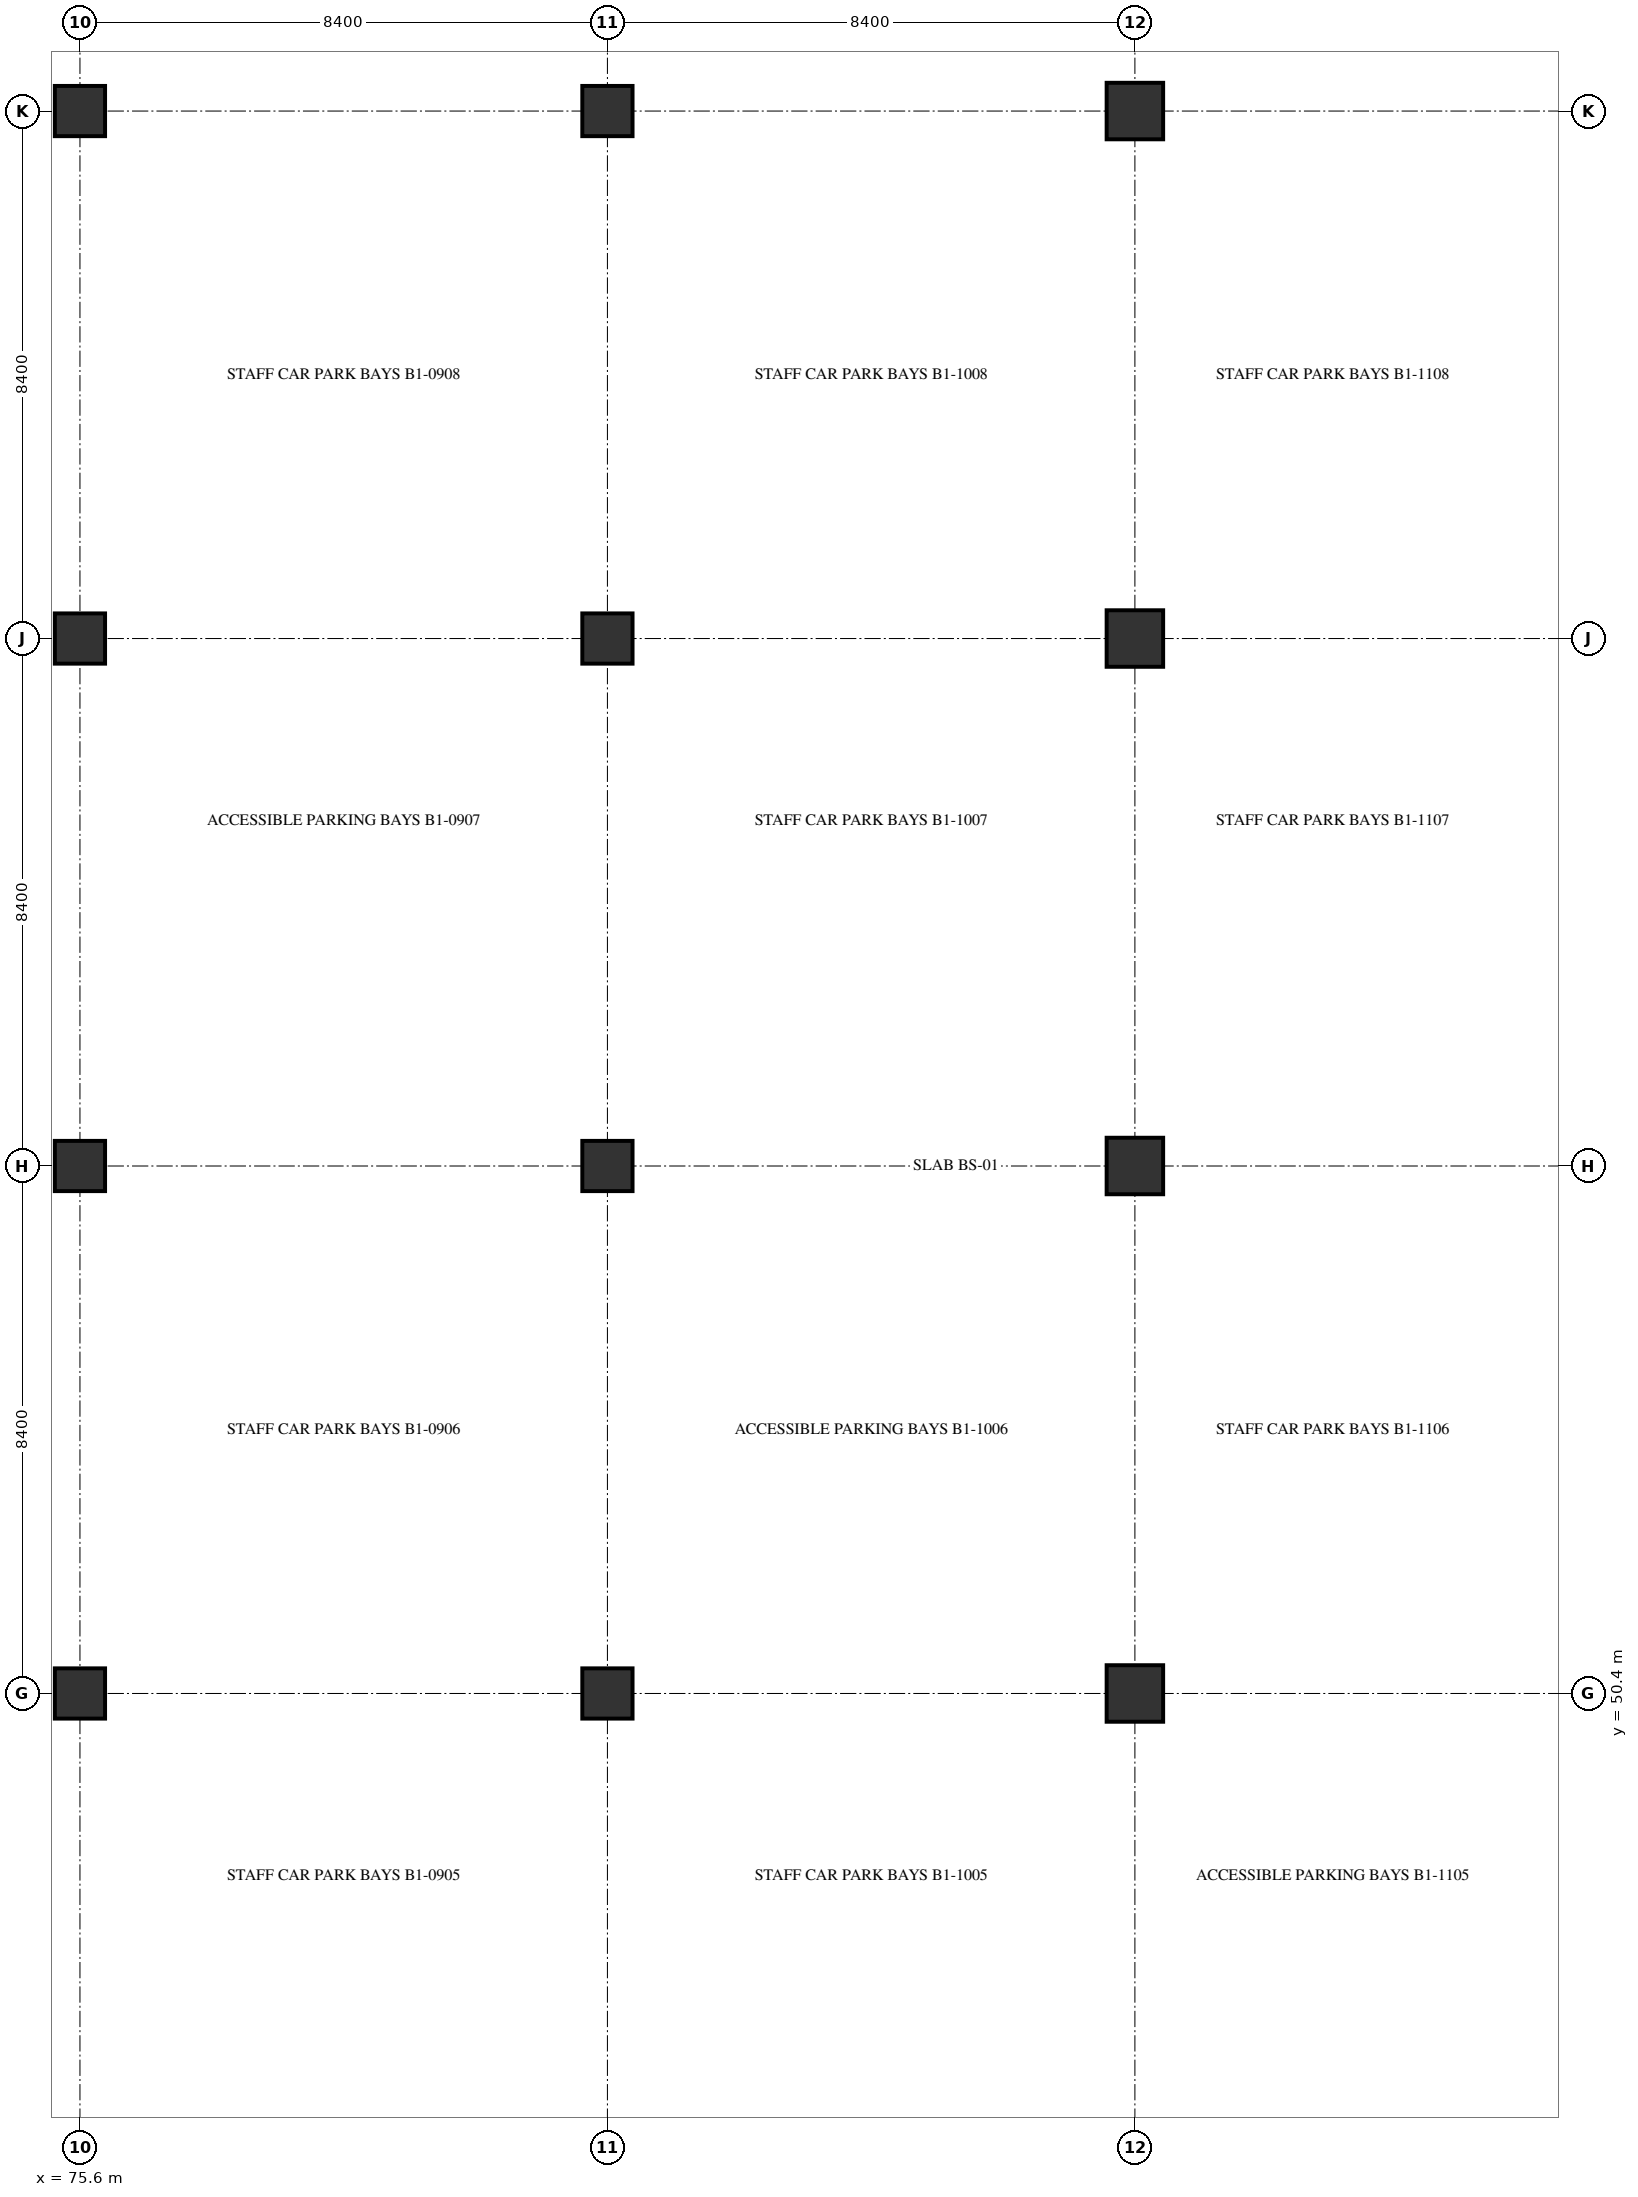
"""IFC4 building model, lengths in metres.
Left out: names, types, materials, properties, quantities, classifications, styles, units other than length and angle.
Written with IfcOpenShell. Run it as: python <this file> out.ifc"""

import sys

from ifc_helpers import new_model, si_unit, direction, frame, origin, origin_2d, place, context, subcontext, project, spatial, rectangle, extrude, element, save


model = new_model("IFC4")
c1 = context("Model", 3, precision=1e-05, world=origin(), true_north=direction((0.0, 1.0)))
c2 = subcontext(c1, "Body", "Model", "MODEL_VIEW")
j1 = project(units=[si_unit("LENGTHUNIT", "METRE"), si_unit("PLANEANGLEUNIT", "RADIAN")], contexts=[c1])
p1 = place(None, origin())
s1 = spatial("IfcSite", under=j1, at=p1, CompositionType="ELEMENT")
p2 = place(p1, origin())
s2 = spatial("IfcBuilding", under=s1, at=p2, CompositionType="ELEMENT")
p3 = place(p2, frame((0.0, 0.0, -5.4)))
s3 = spatial("IfcBuildingStorey", under=s2, at=p3, CompositionType="ELEMENT", Elevation=-5.4)
for number, where, z_axis, x_axis in (
    (1, (75.6, 50.4, 0.0), (0.0, 0.0, 1.0), (1.0, 0.0, 0.0)),
    (2, (75.6, 58.8, 0.0), (0.0, 0.0, 1.0), (1.0, 0.0, 0.0)),
    (3, (75.6, 67.2, 0.0), (0.0, 0.0, 1.0), (1.0, 0.0, 0.0)),
    (4, (75.6, 75.6, 0.0), (0.0, 0.0, 1.0), (1.0, 0.0, 0.0)),
    (5, (84.0, 50.4, 0.0), (0.0, 0.0, 1.0), (1.0, 0.0, 0.0)),
    (6, (84.0, 58.8, 0.0), (0.0, 0.0, 1.0), (1.0, 0.0, 0.0)),
    (7, (84.0, 67.2, 0.0), (0.0, 0.0, 1.0), (1.0, 0.0, 0.0)),
    (8, (84.0, 75.6, 0.0), (0.0, 0.0, 1.0), (1.0, 0.0, 0.0)),
):
    element("IfcColumn", number, at=place(p3, frame(where, z_axis=z_axis, x_axis=x_axis)), inside=s3, PredefinedType="COLUMN", context=c2, shape_type="SweptSolid", body=[
        extrude(rectangle(XDim=0.8, YDim=0.8, at=origin_2d()), origin(), (0.0, 0.0, 1.0), 5.4),
    ])
for number, where, z_axis, x_axis in (
    (9, (92.4, 50.4, 0.0), (0.0, 0.0, 1.0), (1.0, 0.0, 0.0)),
    (10, (92.4, 58.8, 0.0), (0.0, 0.0, 1.0), (1.0, 0.0, 0.0)),
    (11, (92.4, 67.2, 0.0), (0.0, 0.0, 1.0), (1.0, 0.0, 0.0)),
    (12, (92.4, 75.6, 0.0), (0.0, 0.0, 1.0), (1.0, 0.0, 0.0)),
):
    element("IfcColumn", number, at=place(p3, frame(where, z_axis=z_axis, x_axis=x_axis)), inside=s3, PredefinedType="COLUMN", context=c2, shape_type="SweptSolid", body=[
        extrude(rectangle(XDim=0.9, YDim=0.9, at=origin_2d()), origin(), (0.0, 0.0, 1.0), 5.4),
    ])
save(model, sys.argv[1])
